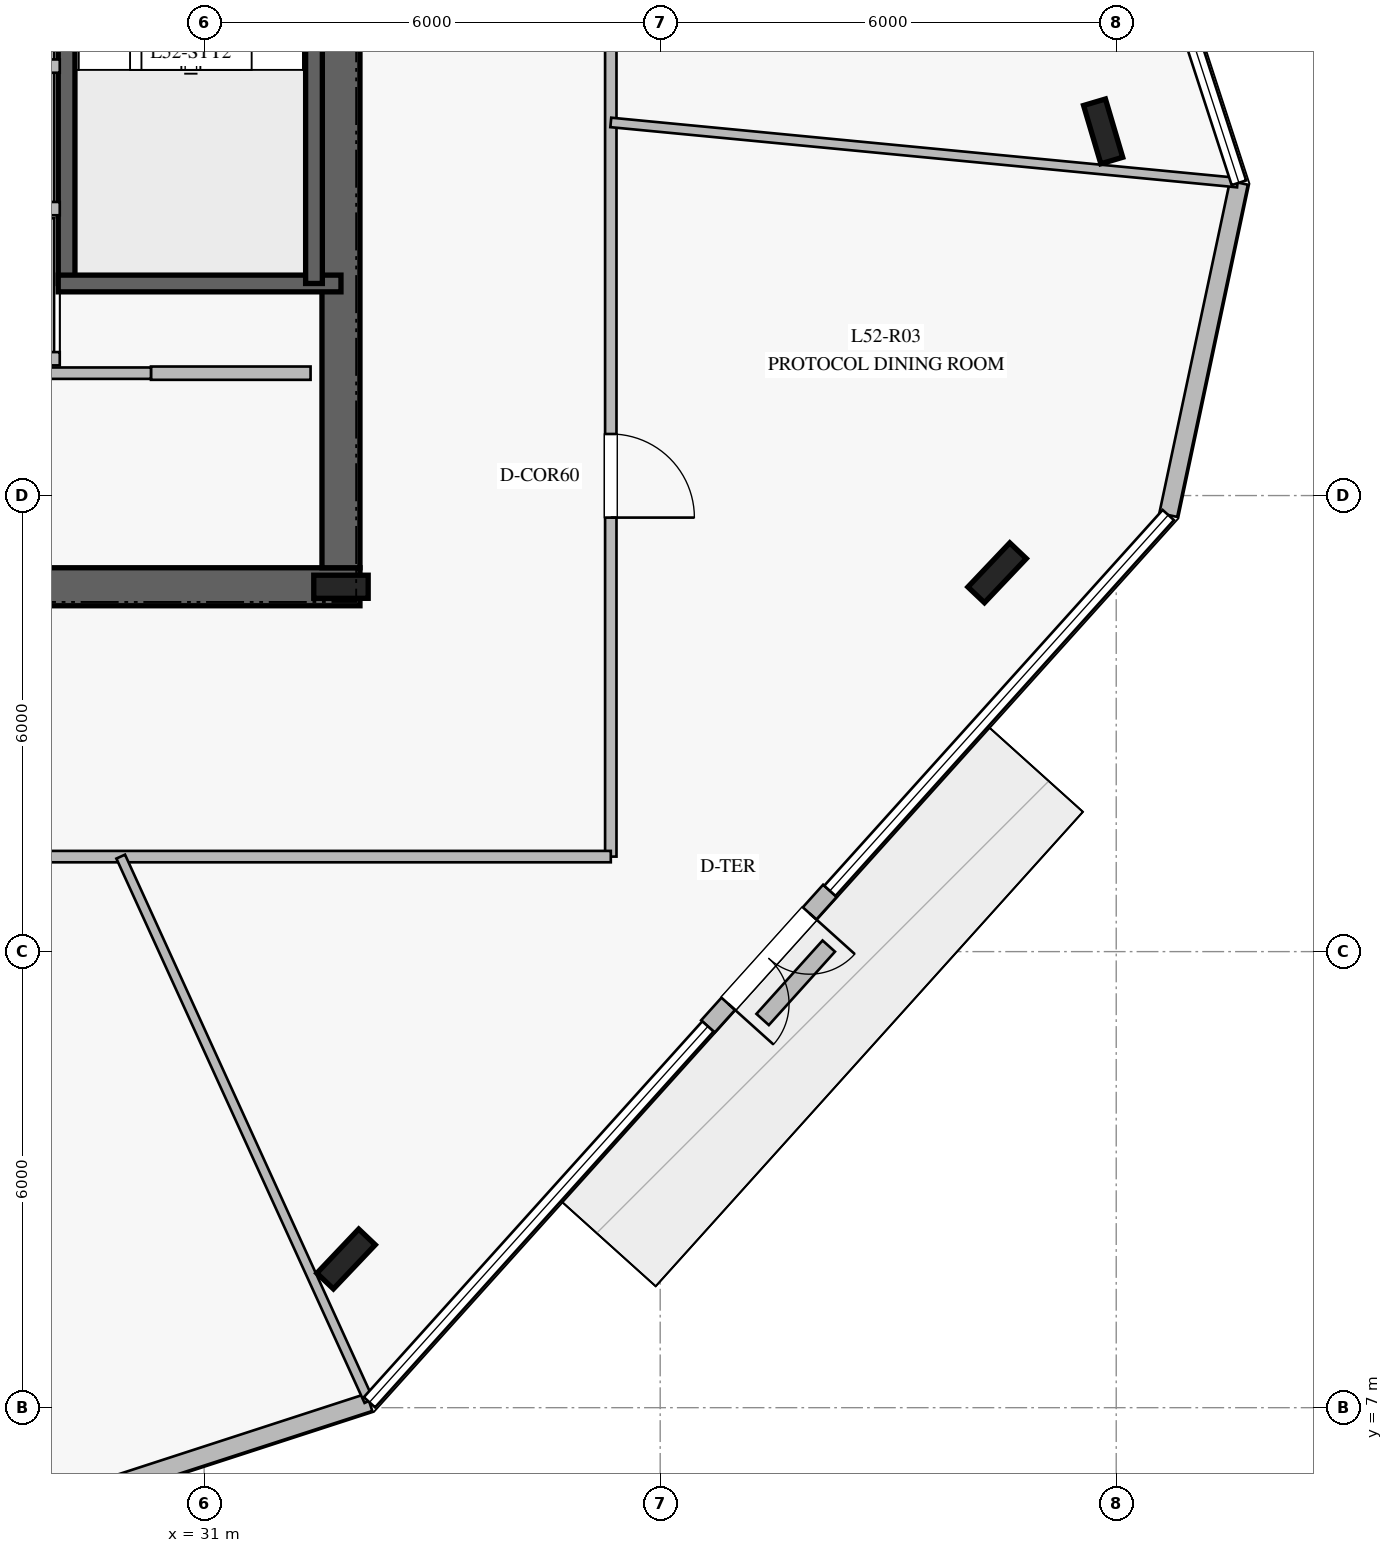
"""IFC4 building model, lengths in metres.
Left out: names, types, materials, properties, quantities, classifications, styles, units other than length and angle.
Written with IfcOpenShell. Run it as: python <this file> out.ifc"""

import sys

from ifc_helpers import new_model, si_unit, direction, frame, frame_2d, origin, origin_2d, place, context, subcontext, project, spatial, rectangle, i_section, extrude, element, fill, save


model = new_model("IFC4")
c1 = context("Model", 3, precision=1e-05, world=origin(), true_north=direction((0.0, 1.0)))
c2 = subcontext(c1, "Body", "Model", "MODEL_VIEW")
j1 = project(units=[si_unit("LENGTHUNIT", "METRE"), si_unit("PLANEANGLEUNIT", "RADIAN")], contexts=[c1])
p1 = place(None, origin())
s1 = spatial("IfcSite", under=j1, at=p1, CompositionType="ELEMENT")
p2 = place(p1, origin())
s2 = spatial("IfcBuilding", under=s1, at=p2, CompositionType="ELEMENT")
p3 = place(p2, frame((0.0, 0.0, 216.8)))
s3 = spatial("IfcBuildingStorey", under=s2, at=p3, CompositionType="ELEMENT", Elevation=216.8)
p4 = place(p3, frame((16.95, 17.8, 0.0), z_axis=(0.0, 0.0, 1.0), x_axis=(1.0, 0.0, 0.0)))
e1 = element("IfcWall", 1, at=p4, inside=s3, PredefinedType="SHEAR", context=c2, shape_type="SweptSolid", body=[
    extrude(rectangle(XDim=16.1, YDim=0.5, at=frame_2d((8.05, 0.0))), origin(), (0.0, 0.0, 1.0), 3.78),
])
p5 = place(p4, frame((5.0, 0.0, 0.0)))
e2 = element("IfcOpeningElement", 2, at=p5, cuts=e1, PredefinedType="OPENING", context=c2, shape_type="SweptSolid", body=[
    extrude(rectangle(XDim=1.2, YDim=2.25, at=frame_2d((0.6, 1.125))), frame((0.0, 0.26, 0.0), z_axis=(0.0, -1.0, 0.0), x_axis=(1.0, 0.0, 0.0)), (0.0, 0.0, 1.0), 0.52),
])
p6 = place(p4, frame((10.9, 0.0, 0.0)))
e3 = element("IfcOpeningElement", 3, at=p6, cuts=e1, PredefinedType="OPENING", context=c2, shape_type="SweptSolid", body=[
    extrude(rectangle(XDim=1.1, YDim=2.2, at=frame_2d((0.55, 1.1))), frame((0.0, 0.26, 0.0), z_axis=(0.0, -1.0, 0.0), x_axis=(1.0, 0.0, 0.0)), (0.0, 0.0, 1.0), 0.52),
])
p7 = place(p3, frame((32.8, 18.05, 0.0), z_axis=(0.0, 0.0, 1.0), x_axis=(0.0, 1.0, 0.0)))
e4 = element("IfcWall", 4, at=p7, inside=s3, PredefinedType="SHEAR", context=c2, shape_type="SweptSolid", body=[
    extrude(rectangle(XDim=13.9, YDim=0.5, at=frame_2d((6.95, 0.0))), origin(), (0.0, 0.0, 1.0), 3.78),
])
p8 = place(p3, frame((32.8, 17.8, 0.0), z_axis=(0.0, 0.0, 1.0), x_axis=(1.0, 0.0, 0.0)))
e5 = element("IfcColumn", 5, at=p8, inside=s3, PredefinedType="COLUMN", context=c2, shape_type="SweptSolid", body=[
    extrude(i_section(OverallWidth=0.304, OverallDepth=0.716, WebThickness=0.021, FlangeThickness=0.04, at=origin_2d()), origin(), (0.0, 0.0, 1.0), 4.0),
])
p9 = place(p3, frame((29.19, 21.79, 0.0), z_axis=(0.0, 0.0, 1.0), x_axis=(0.0, 1.0, 0.0)))
e6 = element("IfcWall", 6, at=p9, inside=s3, PredefinedType="SOLIDWALL", context=c2, shape_type="SweptSolid", body=[
    extrude(rectangle(XDim=7.22, YDim=0.22, at=frame_2d((3.61, 0.0))), origin(), (0.0, 0.0, 1.0), 3.78),
])
p10 = place(p9, frame((5.88, 0.0, 0.0)))
e7 = element("IfcOpeningElement", 7, at=p10, cuts=e6, PredefinedType="OPENING", context=c2, shape_type="SweptSolid", body=[
    extrude(rectangle(XDim=1.15, YDim=2.2, at=frame_2d((0.575, 1.1))), frame((0.0, 0.12, 0.0), z_axis=(0.0, -1.0, 0.0), x_axis=(1.0, 0.0, 0.0)), (0.0, 0.0, 1.0), 0.24),
])
p11 = place(p3, frame((29.08, 21.79, 0.0), z_axis=(0.0, 0.0, 1.0), x_axis=(1.0, 0.0, 0.0)))
e8 = element("IfcWall", 8, at=p11, inside=s3, PredefinedType="SOLIDWALL", context=c2, shape_type="SweptSolid", body=[
    extrude(rectangle(XDim=3.72, YDim=0.22, at=frame_2d((1.86, 0.0))), origin(), (0.0, 0.0, 1.0), 3.78),
])
p12 = place(p3, frame((32.445, 29.01, 0.0), z_axis=(0.0, 0.0, 1.0), x_axis=(0.0, -1.0, 0.0)))
e9 = element("IfcWall", 9, at=p12, inside=s3, PredefinedType="SOLIDWALL", context=c2, shape_type="SweptSolid", body=[
    extrude(rectangle(XDim=7.22, YDim=0.22, at=frame_2d((3.61, 0.0))), origin(), (0.0, 0.0, 1.0), 3.78),
])
for number, where, z_axis, x_axis in (
    (10, (32.867, 8.956, 0.0), (0.0, 0.0, 1.0), (0.688, 0.725, 0.0)),
    (11, (41.433, 17.984, 0.0), (0.0, 0.0, 1.0), (0.688, 0.725, 0.0)),
    (12, (42.828, 23.791, 0.0), (0.0, 0.0, 1.0), (-0.284, 0.959, 0.0)),
):
    element("IfcColumn", number, at=place(p3, frame(where, z_axis=z_axis, x_axis=x_axis)), inside=s3, PredefinedType="COLUMN", context=c2, shape_type="SweptSolid", body=[
        extrude(i_section(OverallWidth=0.3, OverallDepth=0.8, WebThickness=0.018, FlangeThickness=0.033, at=origin_2d()), origin(), (0.0, 0.0, 1.0), 4.0),
    ])
p13 = place(p3, frame((28.925, 5.69, 0.0), z_axis=(0.0, 0.0, 1.0), x_axis=(0.95104370386, 0.309056424215, 0.0)))
e13 = element("IfcWall", 13, at=p13, inside=s3, PredefinedType="STANDARD", context=c2, shape_type="SweptSolid", body=[
    extrude(rectangle(XDim=4.469, YDim=0.24, at=frame_2d((2.234, 0.0))), origin(), (0.0, 0.0, 1.0), 3.78),
])
p14 = place(p3, frame((37.628, 12.016, 0.0), z_axis=(0.0, 0.0, 1.0), x_axis=(0.668835439273, 0.743410489012, 0.0)))
e14 = element("IfcWall", 14, at=p14, inside=s3, PredefinedType="STANDARD", context=c2, shape_type="SweptSolid", body=[
    extrude(rectangle(XDim=2.4, YDim=0.24, at=frame_2d((1.2, 0.0))), origin(), (0.0, 0.0, 1.0), 3.78),
])
p15 = place(p14, frame((0.4, 0.0, 0.0)))
e15 = element("IfcOpeningElement", 15, at=p15, cuts=e14, PredefinedType="OPENING", context=c2, shape_type="SweptSolid", body=[
    extrude(rectangle(XDim=1.6, YDim=2.25, at=frame_2d((0.8, 1.125))), frame((0.0, 0.13, 0.0), z_axis=(0.0, -1.0, 0.0), x_axis=(1.0, 0.0, 0.0)), (0.0, 0.0, 1.0), 0.26),
])
p16 = place(p3, frame((43.685, 18.744, 0.0), z_axis=(0.0, 0.0, 1.0), x_axis=(0.20787966491, 0.978154407503, 0.0)))
e16 = element("IfcWall", 16, at=p16, inside=s3, PredefinedType="STANDARD", context=c2, shape_type="SweptSolid", body=[
    extrude(rectangle(XDim=4.469, YDim=0.24, at=frame_2d((2.234, 0.0))), origin(), (0.0, 0.0, 1.0), 3.78),
])
p17 = place(p3, frame((38.348, 12.107, 0.0), z_axis=(0.0, 0.0, 1.0), x_axis=(0.669244796625, 0.743041992212, 0.0)))
e17 = element("IfcWall", 17, at=p17, inside=s3, PredefinedType="USERDEFINED", context=c2, shape_type="SweptSolid", body=[
    extrude(rectangle(XDim=1.3, YDim=0.22, at=frame_2d((0.65, 0.0))), origin(), (0.0, 0.0, 1.0), 0.4),
])
p18 = place(p3, frame((30.3, 20.61, 0.0), z_axis=(0.0, 0.0, 1.0), x_axis=(1.0, 0.0, 0.0)))
e18 = element("IfcWall", 18, at=p18, inside=s3, PredefinedType="PARTITIONING", context=c2, shape_type="SweptSolid", body=[
    extrude(rectangle(XDim=2.1, YDim=0.175, at=frame_2d((1.05, 0.0))), origin(), (0.0, 0.0, 1.0), 3.78),
])
p19 = place(p3, frame((24.4, 20.61, 0.0), z_axis=(0.0, 0.0, 1.0), x_axis=(1.0, 0.0, 0.0)))
e19 = element("IfcWall", 19, at=p19, inside=s3, PredefinedType="PARTITIONING", context=c2, shape_type="SweptSolid", body=[
    extrude(rectangle(XDim=5.9, YDim=0.15, at=frame_2d((2.95, 0.0))), origin(), (0.0, 0.0, 1.0), 3.78),
])
for number, where, z_axis, x_axis in (
    (20, (26.75, 20.8, 0.0), (0.0, 0.0, 1.0), (1.0, 0.0, 0.0)),
    (21, (26.75, 22.775, 0.0), (0.0, 0.0, 1.0), (1.0, 0.0, 0.0)),
    (22, (26.75, 24.65, 0.0), (0.0, 0.0, 1.0), (1.0, 0.0, 0.0)),
):
    element("IfcWall", number, at=place(p3, frame(where, z_axis=z_axis, x_axis=x_axis)), inside=s3, PredefinedType="PARTITIONING", context=c2, shape_type="SweptSolid", body=[
        extrude(rectangle(XDim=2.35, YDim=0.175, at=frame_2d((1.175, 0.0))), origin(), (0.0, 0.0, 1.0), 3.78),
    ])
p20 = place(p3, frame((36.35, 35.75, 0.0), z_axis=(0.0, 0.0, 1.0), x_axis=(0.0, -1.0, 0.0)))
e23 = element("IfcWall", 23, at=p20, inside=s3, PredefinedType="PARTITIONING", context=c2, shape_type="SweptSolid", body=[
    extrude(rectangle(XDim=21.5, YDim=0.15, at=frame_2d((10.75, 0.0))), origin(), (0.0, 0.0, 1.0), 3.28),
])
p21 = place(p20, frame((15.94, 0.0, 0.0)))
e24 = element("IfcOpeningElement", 24, at=p21, cuts=e23, PredefinedType="OPENING", context=c2, shape_type="SweptSolid", body=[
    extrude(rectangle(XDim=1.1, YDim=2.2, at=frame_2d((0.55, 1.1))), frame((0.0, 0.085, 0.0), z_axis=(0.0, -1.0, 0.0), x_axis=(1.0, 0.0, 0.0)), (0.0, 0.0, 1.0), 0.17),
])
p22 = place(p20, frame((5.6, 0.0, 0.0)))
e25 = element("IfcOpeningElement", 25, at=p22, cuts=e23, PredefinedType="OPENING", context=c2, shape_type="SweptSolid", body=[
    extrude(rectangle(XDim=1.1, YDim=2.2, at=frame_2d((0.55, 1.1))), frame((0.0, 0.085, 0.0), z_axis=(0.0, -1.0, 0.0), x_axis=(1.0, 0.0, 0.0)), (0.0, 0.0, 1.0), 0.17),
])
p23 = place(p3, frame((36.35, 14.25, 0.0), z_axis=(0.0, 0.0, 1.0), x_axis=(-1.0, 0.0, 0.0)))
e26 = element("IfcWall", 26, at=p23, inside=s3, PredefinedType="PARTITIONING", context=c2, shape_type="SweptSolid", body=[
    extrude(rectangle(XDim=22.7, YDim=0.15, at=frame_2d((11.35, 0.0))), origin(), (0.0, 0.0, 1.0), 3.05),
])
p24 = place(p23, frame((18.819, 0.0, 0.0)))
e27 = element("IfcOpeningElement", 27, at=p24, cuts=e26, PredefinedType="OPENING", context=c2, shape_type="SweptSolid", body=[
    extrude(rectangle(XDim=1.1, YDim=2.2, at=frame_2d((0.55, 1.1))), frame((0.0, 0.085, 0.0), z_axis=(0.0, -1.0, 0.0), x_axis=(1.0, 0.0, 0.0)), (0.0, 0.0, 1.0), 0.17),
])
p25 = place(p23, frame((10.682, 0.0, 0.0)))
e28 = element("IfcOpeningElement", 28, at=p25, cuts=e26, PredefinedType="OPENING", context=c2, shape_type="SweptSolid", body=[
    extrude(rectangle(XDim=1.1, YDim=2.2, at=frame_2d((0.55, 1.1))), frame((0.0, 0.085, 0.0), z_axis=(0.0, -1.0, 0.0), x_axis=(1.0, 0.0, 0.0)), (0.0, 0.0, 1.0), 0.17),
])
p26 = place(p3, frame((29.902, 14.25, 0.0), z_axis=(0.0, 0.0, 1.0), x_axis=(0.414791209968, -0.909916618231, 0.0)))
e29 = element("IfcWall", 29, at=p26, inside=s3, PredefinedType="PARTITIONING", context=c2, shape_type="SweptSolid", body=[
    extrude(rectangle(XDim=7.871, YDim=0.125, at=frame_2d((3.936, 0.0))), origin(), (0.0, 0.0, 1.0), 3.18),
])
p27 = place(p3, frame((36.35, 23.909, 0.0), z_axis=(0.0, 0.0, 1.0), x_axis=(0.995419121173, -0.095607390943, 0.0)))
e30 = element("IfcWall", 30, at=p27, inside=s3, PredefinedType="PARTITIONING", context=c2, shape_type="SweptSolid", body=[
    extrude(rectangle(XDim=8.284, YDim=0.125, at=frame_2d((4.142, 0.0))), origin(), (0.0, 0.0, 1.0), 3.18),
])
p28 = place(p15, frame((1.6, 0.0, 0.0), z_axis=(0.0, 0.0, 1.0), x_axis=(-1.0, 0.0, 0.0)))
e31 = element("IfcDoor", 31, at=p28, inside=s3, OperationType="DOUBLE_DOOR_SINGLE_SWING", PredefinedType="DOOR", context=c2, shape_type="SweptSolid", body=[
    extrude(rectangle(XDim=1.6, YDim=2.25, at=frame_2d((0.8, 1.125))), frame((0.0, 0.025, 0.0), z_axis=(0.0, -1.0, 0.0), x_axis=(1.0, 0.0, 0.0)), (0.0, 0.0, 1.0), 0.05),
])
fill(e15, e31)
p29 = place(p21, origin())
e32 = element("IfcDoor", 32, at=p29, inside=s3, OperationType="SINGLE_SWING_RIGHT", PredefinedType="DOOR", context=c2, shape_type="SweptSolid", body=[
    extrude(rectangle(XDim=1.1, YDim=2.2, at=frame_2d((0.55, 1.1))), frame((0.0, 0.025, 0.0), z_axis=(0.0, -1.0, 0.0), x_axis=(1.0, 0.0, 0.0)), (0.0, 0.0, 1.0), 0.05),
])
fill(e24, e32)
save(model, sys.argv[1])
